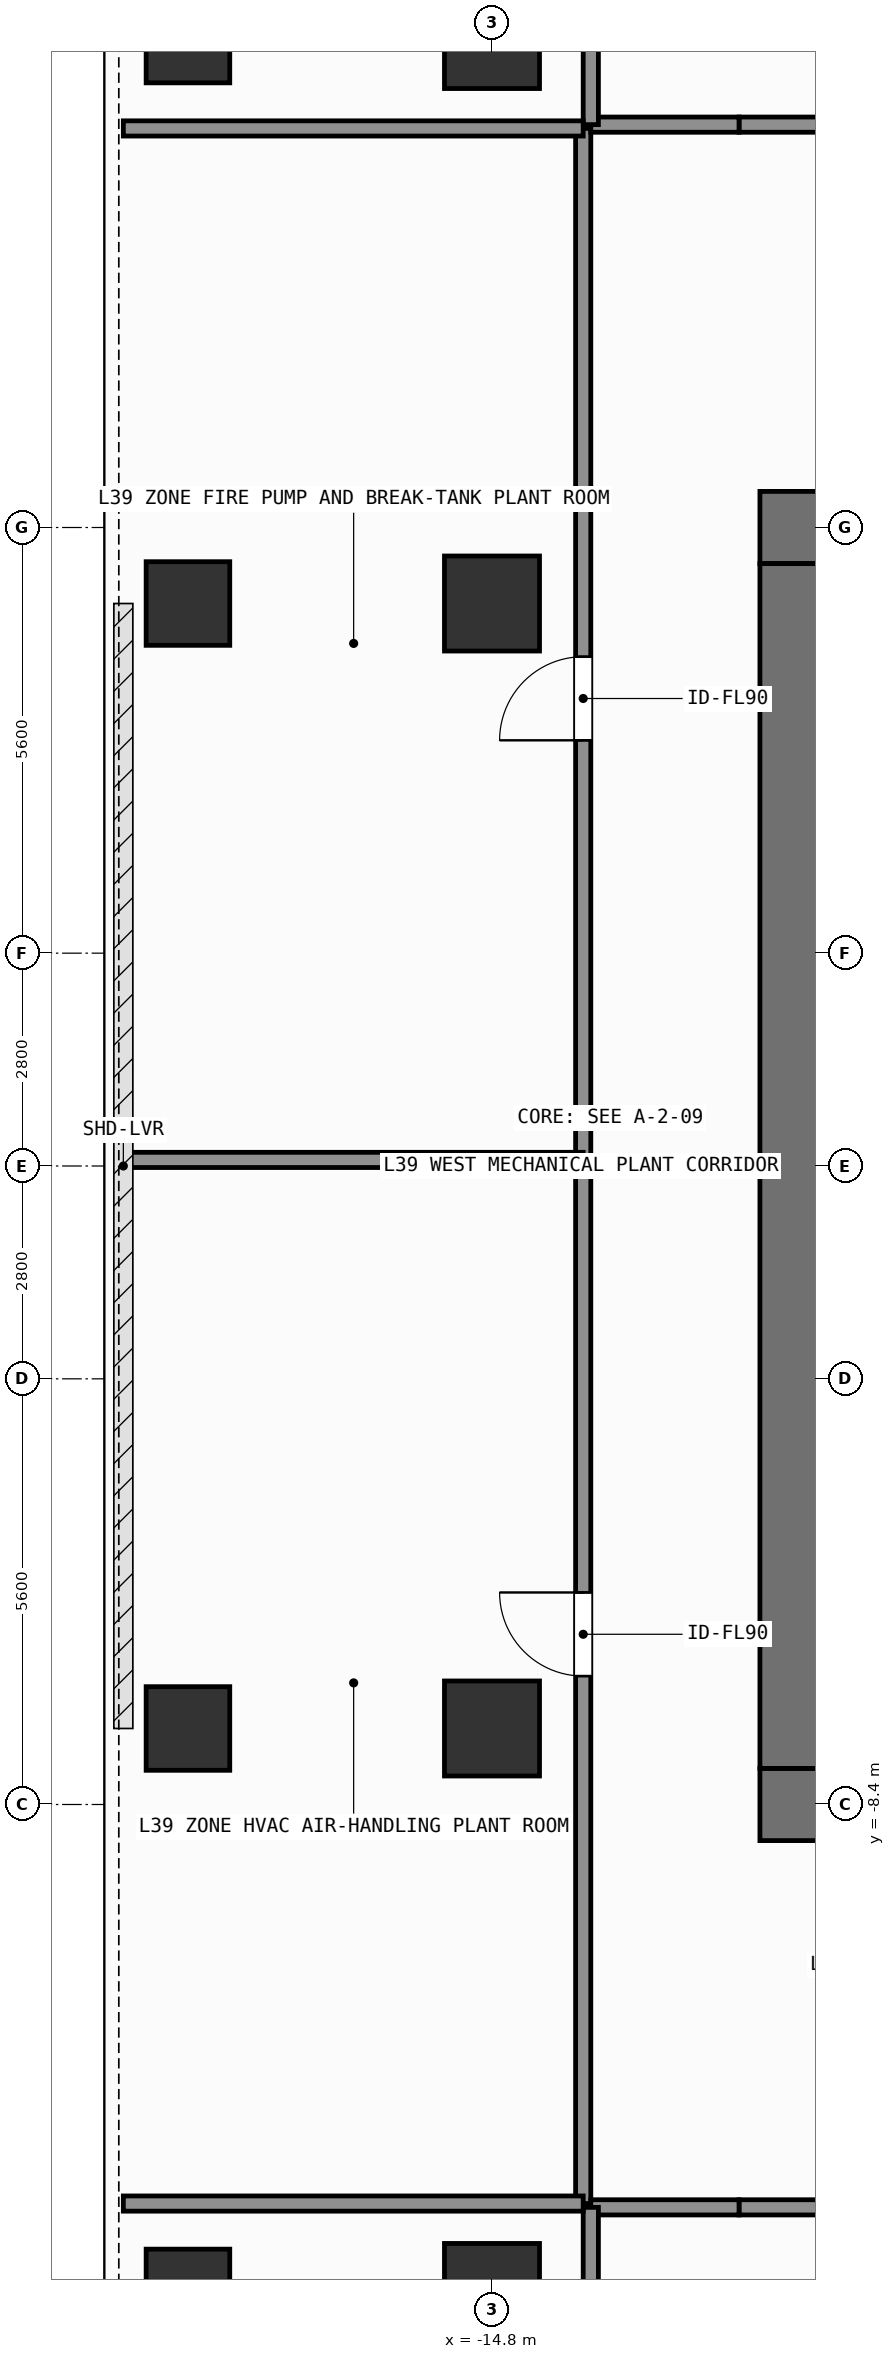
"""IFC4 building model, lengths in metres.
Left out: names, types, materials, properties, quantities, classifications, styles, units other than length and angle.
Written with IfcOpenShell. Run it as: python <this file> out.ifc"""

import sys

from ifc_helpers import new_model, si_unit, direction, frame, frame_2d, origin, origin_2d, place, context, subcontext, project, spatial, rectangle, extrude, element, fill, save


model = new_model("IFC4")
c1 = context("Model", 3, precision=1e-05, world=origin(), true_north=direction((0.0, 1.0)))
c2 = subcontext(c1, "Body", "Model", "MODEL_VIEW")
j1 = project(units=[si_unit("LENGTHUNIT", "METRE"), si_unit("PLANEANGLEUNIT", "RADIAN")], contexts=[c1])
p1 = place(None, origin())
s1 = spatial("IfcSite", under=j1, at=p1, CompositionType="ELEMENT")
p2 = place(p1, origin())
s2 = spatial("IfcBuilding", under=s1, at=p2, CompositionType="ELEMENT")
p3 = place(p2, frame((0.0, 0.0, 156.3)))
s3 = spatial("IfcBuildingStorey", under=s2, at=p3, CompositionType="ELEMENT", Elevation=156.3)
for number, where, z_axis, x_axis in (
    (1, (-11.275, -8.4, 0.0), (0.0, 0.0, 1.0), (1.0, 0.0, 0.0)),
    (2, (-11.275, 8.4, 0.0), (0.0, 0.0, 1.0), (1.0, 0.0, 0.0)),
):
    element("IfcWall", number, at=place(p3, frame(where, z_axis=z_axis, x_axis=x_axis)), inside=s3, PredefinedType="SHEAR", context=c2, shape_type="SweptSolid", body=[
        extrude(rectangle(XDim=1.575, YDim=0.95, at=frame_2d((0.788, 0.0))), origin(), (0.0, 0.0, 1.0), 7.8),
    ])
p4 = place(p3, frame((-10.8, -7.925, 0.0), z_axis=(0.0, 0.0, 1.0), x_axis=(0.0, 1.0, 0.0)))
e3 = element("IfcWall", 3, at=p4, inside=s3, PredefinedType="SHEAR", context=c2, shape_type="SweptSolid", body=[
    extrude(rectangle(XDim=15.85, YDim=0.95, at=frame_2d((7.925, 0.0))), origin(), (0.0, 0.0, 1.0), 7.8),
])
for number, where, z_axis, x_axis in (
    (4, (-14.8, -14.8, 0.0), (0.0, 0.0, 1.0), (1.0, 0.0, 0.0)),
    (5, (-14.8, 14.8, 0.0), (0.0, 0.0, 1.0), (1.0, 0.0, 0.0)),
    (6, (-14.8, -7.4, 0.0), (0.0, 0.0, 1.0), (1.0, 0.0, 0.0)),
    (7, (-14.8, 7.4, 0.0), (0.0, 0.0, 1.0), (1.0, 0.0, 0.0)),
):
    element("IfcColumn", number, at=place(p3, frame(where, z_axis=z_axis, x_axis=x_axis)), inside=s3, PredefinedType="COLUMN", context=c2, shape_type="SweptSolid", body=[
        extrude(rectangle(XDim=1.25, YDim=1.25, at=origin_2d()), origin(), (0.0, 0.0, 1.0), 7.8),
    ])
for number, where, z_axis, x_axis in (
    (8, (-18.8, -14.8, 0.0), (0.0, 0.0, 1.0), (1.0, 0.0, 0.0)),
    (9, (-18.8, -7.4, 0.0), (0.0, 0.0, 1.0), (1.0, 0.0, 0.0)),
    (10, (-18.8, 7.4, 0.0), (0.0, 0.0, 1.0), (1.0, 0.0, 0.0)),
    (11, (-18.8, 14.8, 0.0), (0.0, 0.0, 1.0), (1.0, 0.0, 0.0)),
):
    element("IfcColumn", number, at=place(p3, frame(where, z_axis=z_axis, x_axis=x_axis)), inside=s3, PredefinedType="COLUMN", context=c2, shape_type="SweptSolid", body=[
        extrude(rectangle(XDim=1.1, YDim=1.1, at=origin_2d()), origin(), (0.0, 0.0, 1.0), 7.8),
    ])
p5 = place(p3, frame((-11.55, -13.7, 0.0), z_axis=(0.0, 0.0, 1.0), x_axis=(1.0, 0.0, 0.0)))
e12 = element("IfcWall", 12, at=p5, inside=s3, PredefinedType="SOLIDWALL", context=c2, shape_type="SweptSolid", body=[
    extrude(rectangle(XDim=27.15, YDim=0.2, at=frame_2d((13.575, 0.0))), origin(), (0.0, 0.0, 1.0), 7.58),
])
p6 = place(p5, frame((9.114, 0.0, 0.0)))
e13 = element("IfcOpeningElement", 13, at=p6, cuts=e12, PredefinedType="OPENING", context=c2, shape_type="SweptSolid", body=[
    extrude(rectangle(XDim=1.4, YDim=2.2, at=frame_2d((0.7, 1.1))), frame((0.0, 0.11, 0.0), z_axis=(0.0, -1.0, 0.0), x_axis=(1.0, 0.0, 0.0)), (0.0, 0.0, 1.0), 0.22),
])
p7 = place(p3, frame((-11.55, 13.7, 0.0), z_axis=(0.0, 0.0, 1.0), x_axis=(1.0, 0.0, 0.0)))
e14 = element("IfcWall", 14, at=p7, inside=s3, PredefinedType="SOLIDWALL", context=c2, shape_type="SweptSolid", body=[
    extrude(rectangle(XDim=27.15, YDim=0.2, at=frame_2d((13.575, 0.0))), origin(), (0.0, 0.0, 1.0), 7.58),
])
p8 = place(p7, frame((9.114, 0.0, 0.0)))
e15 = element("IfcOpeningElement", 15, at=p8, cuts=e14, PredefinedType="OPENING", context=c2, shape_type="SweptSolid", body=[
    extrude(rectangle(XDim=1.4, YDim=2.2, at=frame_2d((0.7, 1.1))), frame((0.0, 0.11, 0.0), z_axis=(0.0, -1.0, 0.0), x_axis=(1.0, 0.0, 0.0)), (0.0, 0.0, 1.0), 0.22),
])
p9 = place(p3, frame((-13.6, -13.65, 0.0), z_axis=(0.0, 0.0, 1.0), x_axis=(0.0, 1.0, 0.0)))
e16 = element("IfcWall", 16, at=p9, inside=s3, PredefinedType="SOLIDWALL", context=c2, shape_type="SweptSolid", body=[
    extrude(rectangle(XDim=13.73, YDim=0.2, at=frame_2d((6.865, 0.0))), origin(), (0.0, 0.0, 1.0), 7.58),
])
p10 = place(p9, frame((6.939, 0.0, 0.0)))
e17 = element("IfcOpeningElement", 17, at=p10, cuts=e16, PredefinedType="OPENING", context=c2, shape_type="SweptSolid", body=[
    extrude(rectangle(XDim=1.1, YDim=2.15, at=frame_2d((0.55, 1.075))), frame((0.0, 0.11, 0.0), z_axis=(0.0, -1.0, 0.0), x_axis=(1.0, 0.0, 0.0)), (0.0, 0.0, 1.0), 0.22),
])
p11 = place(p3, frame((-13.6, 0.08, 0.0), z_axis=(0.0, 0.0, 1.0), x_axis=(0.0, 1.0, 0.0)))
e18 = element("IfcWall", 18, at=p11, inside=s3, PredefinedType="SOLIDWALL", context=c2, shape_type="SweptSolid", body=[
    extrude(rectangle(XDim=13.57, YDim=0.2, at=frame_2d((6.785, 0.0))), origin(), (0.0, 0.0, 1.0), 7.58),
])
p12 = place(p11, frame((5.52, 0.0, 0.0)))
e19 = element("IfcOpeningElement", 19, at=p12, cuts=e18, PredefinedType="OPENING", context=c2, shape_type="SweptSolid", body=[
    extrude(rectangle(XDim=1.1, YDim=2.15, at=frame_2d((0.55, 1.075))), frame((0.0, 0.11, 0.0), z_axis=(0.0, -1.0, 0.0), x_axis=(1.0, 0.0, 0.0)), (0.0, 0.0, 1.0), 0.22),
])
for number, where, z_axis, x_axis in (
    (20, (-13.5, -13.7, 0.0), (0.0, 0.0, 1.0), (1.0, 0.0, 0.0)),
    (21, (-13.5, 13.7, 0.0), (0.0, 0.0, 1.0), (1.0, 0.0, 0.0)),
):
    element("IfcWall", number, at=place(p3, frame(where, z_axis=z_axis, x_axis=x_axis)), inside=s3, PredefinedType="SOLIDWALL", context=c2, shape_type="SweptSolid", body=[
        extrude(rectangle(XDim=1.95, YDim=0.2, at=frame_2d((0.975, 0.0))), origin(), (0.0, 0.0, 1.0), 7.58),
    ])
for number, where, z_axis, x_axis in (
    (22, (-13.5, -23.55, 0.0), (0.0, 0.0, 1.0), (0.0, 1.0, 0.0)),
    (23, (-13.5, 13.7, 0.0), (0.0, 0.0, 1.0), (0.0, 1.0, 0.0)),
):
    element("IfcWall", number, at=place(p3, frame(where, z_axis=z_axis, x_axis=x_axis)), inside=s3, PredefinedType="SOLIDWALL", context=c2, shape_type="SweptSolid", body=[
        extrude(rectangle(XDim=9.85, YDim=0.2, at=frame_2d((4.925, 0.0))), origin(), (0.0, 0.0, 1.0), 7.58),
    ])
for number, where, z_axis, x_axis in (
    (24, (-19.65, -13.65, 0.0), (0.0, 0.0, 1.0), (1.0, 0.0, 0.0)),
    (25, (-19.65, 13.65, 0.0), (0.0, 0.0, 1.0), (1.0, 0.0, 0.0)),
    (26, (-19.65, 0.08, 0.0), (0.0, 0.0, 1.0), (1.0, 0.0, 0.0)),
):
    element("IfcWall", number, at=place(p3, frame(where, z_axis=z_axis, x_axis=x_axis)), inside=s3, PredefinedType="SOLIDWALL", context=c2, shape_type="SweptSolid", body=[
        extrude(rectangle(XDim=6.05, YDim=0.2, at=frame_2d((3.025, 0.0))), origin(), (0.0, 0.0, 1.0), 7.58),
    ])
p13 = place(p10, origin())
e27 = element("IfcDoor", 27, at=p13, inside=s3, OperationType="SINGLE_SWING_RIGHT", PredefinedType="DOOR", context=c2, shape_type="SweptSolid", body=[
    extrude(rectangle(XDim=1.1, YDim=2.15, at=frame_2d((0.55, 1.075))), frame((0.0, 0.025, 0.0), z_axis=(0.0, -1.0, 0.0), x_axis=(1.0, 0.0, 0.0)), (0.0, 0.0, 1.0), 0.05),
])
fill(e17, e27)
p14 = place(p12, origin())
e28 = element("IfcDoor", 28, at=p14, inside=s3, OperationType="SINGLE_SWING_LEFT", PredefinedType="DOOR", context=c2, shape_type="SweptSolid", body=[
    extrude(rectangle(XDim=1.1, YDim=2.15, at=frame_2d((0.55, 1.075))), frame((0.0, 0.025, 0.0), z_axis=(0.0, -1.0, 0.0), x_axis=(1.0, 0.0, 0.0)), (0.0, 0.0, 1.0), 0.05),
])
fill(e19, e28)
save(model, sys.argv[1])
